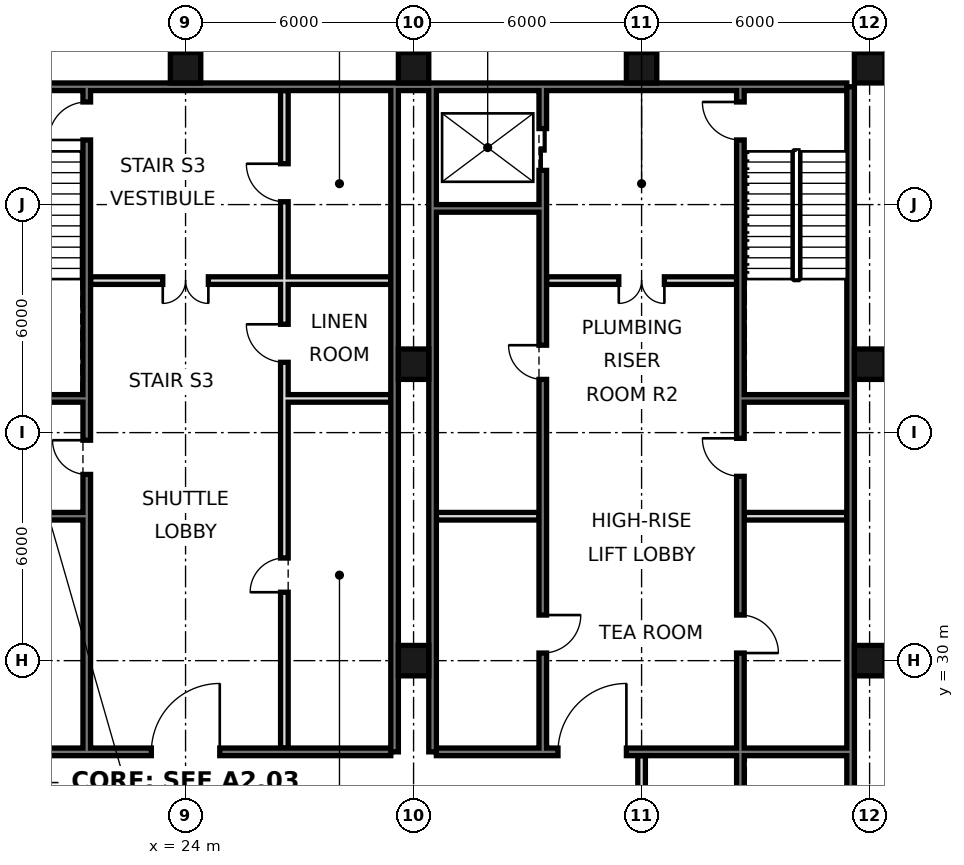
"""IFC4 building model, lengths in metres.
Left out: names, types, materials, properties, quantities, classifications, styles, units other than length and angle.
Written with IfcOpenShell. Run it as: python <this file> out.ifc"""

import sys

from ifc_helpers import new_model, si_unit, direction, frame, frame_2d, origin, origin_2d, place, context, subcontext, project, spatial, rectangle, hollow_rectangle, extrude, element, fill, save


model = new_model("IFC4")
c1 = context("Model", 3, precision=1e-05, world=origin(), true_north=direction((0.0, 1.0)))
c2 = subcontext(c1, "Body", "Model", "MODEL_VIEW")
j1 = project(units=[si_unit("LENGTHUNIT", "METRE"), si_unit("PLANEANGLEUNIT", "RADIAN")], contexts=[c1])
p1 = place(None, origin())
s1 = spatial("IfcSite", under=j1, at=p1, CompositionType="ELEMENT")
p2 = place(p1, origin())
s2 = spatial("IfcBuilding", under=s1, at=p2, CompositionType="ELEMENT")
p3 = place(p2, frame((0.0, 0.0, -4.5)))
s3 = spatial("IfcBuildingStorey", under=s2, at=p3, CompositionType="ELEMENT", Elevation=-4.5)
for number, where, z_axis, x_axis in (
    (1, (24.0, 45.6, 0.0), (0.0, 0.0, 1.0), (1.0, 0.0, 0.0)),
    (2, (30.0, 30.0, 0.0), (0.0, 0.0, 1.0), (1.0, 0.0, 0.0)),
    (3, (30.0, 37.8, 0.0), (0.0, 0.0, 1.0), (1.0, 0.0, 0.0)),
    (4, (30.0, 45.6, 0.0), (0.0, 0.0, 1.0), (1.0, 0.0, 0.0)),
    (5, (36.0, 45.6, 0.0), (0.0, 0.0, 1.0), (1.0, 0.0, 0.0)),
    (6, (42.0, 30.0, 0.0), (0.0, 0.0, 1.0), (1.0, 0.0, 0.0)),
    (7, (42.0, 37.8, 0.0), (0.0, 0.0, 1.0), (1.0, 0.0, 0.0)),
    (8, (42.0, 45.6, 0.0), (0.0, 0.0, 1.0), (1.0, 0.0, 0.0)),
):
    element("IfcColumn", number, at=place(p3, frame(where, z_axis=z_axis, x_axis=x_axis)), inside=s3, PredefinedType="COLUMN", context=c2, shape_type="SweptSolid", body=[
        extrude(hollow_rectangle(XDim=0.8, YDim=0.8, WallThickness=0.07, at=origin_2d()), origin(), (0.0, 0.0, 1.0), 4.5),
    ])
p4 = place(p3, frame((41.5, 21.6, 0.0), z_axis=(0.0, 0.0, 1.0), x_axis=(0.0, 1.0, 0.0)))
e9 = element("IfcWall", 9, at=p4, inside=s3, PredefinedType="SOLIDWALL", context=c2, shape_type="SweptSolid", body=[
    extrude(rectangle(XDim=23.5, YDim=0.2, at=frame_2d((11.75, 0.0))), origin(), (0.0, 0.0, 1.0), 4.14),
])
p5 = place(p3, frame((6.6, 45.1, 0.0), z_axis=(0.0, 0.0, 1.0), x_axis=(1.0, 0.0, 0.0)))
e10 = element("IfcWall", 10, at=p5, inside=s3, PredefinedType="SOLIDWALL", context=c2, shape_type="SweptSolid", body=[
    extrude(rectangle(XDim=34.8, YDim=0.2, at=frame_2d((17.4, 0.0))), origin(), (0.0, 0.0, 1.0), 4.14),
])
for number, where, z_axis, x_axis in (
    (11, (29.5, 27.6, 0.0), (0.0, 0.0, 1.0), (0.0, 1.0, 0.0)),
    (12, (30.5, 27.6, 0.0), (0.0, 0.0, 1.0), (0.0, 1.0, 0.0)),
):
    element("IfcWall", number, at=place(p3, frame(where, z_axis=z_axis, x_axis=x_axis)), inside=s3, PredefinedType="SOLIDWALL", context=c2, shape_type="SweptSolid", body=[
        extrude(rectangle(XDim=17.5, YDim=0.2, at=frame_2d((8.75, 0.0))), origin(), (0.0, 0.0, 1.0), 4.14),
    ])
p6 = place(p3, frame((21.4, 27.7, 0.0), z_axis=(0.0, 0.0, 1.0), x_axis=(0.0, 1.0, 0.0)))
e13 = element("IfcWall", 13, at=p6, inside=s3, PredefinedType="SOLIDWALL", context=c2, shape_type="SweptSolid", body=[
    extrude(rectangle(XDim=17.3, YDim=0.2, at=frame_2d((8.65, 0.0))), origin(), (0.0, 0.0, 1.0), 4.14),
])
p7 = place(p6, frame((16.0, 0.0, 0.0)))
e14 = element("IfcOpeningElement", 14, at=p7, cuts=e13, PredefinedType="OPENING", context=c2, shape_type="SweptSolid", body=[
    extrude(rectangle(XDim=1.0, YDim=2.1, at=frame_2d((0.5, 1.05))), frame((0.0, 0.11, 0.0), z_axis=(0.0, -1.0, 0.0), x_axis=(1.0, 0.0, 0.0)), (0.0, 0.0, 1.0), 0.22),
])
p8 = place(p6, frame((7.2, 0.0, 0.0)))
e15 = element("IfcOpeningElement", 15, at=p8, cuts=e13, PredefinedType="OPENING", context=c2, shape_type="SweptSolid", body=[
    extrude(rectangle(XDim=0.9, YDim=2.1, at=frame_2d((0.45, 1.05))), frame((0.0, 0.11, 0.0), z_axis=(0.0, -1.0, 0.0), x_axis=(1.0, 0.0, 0.0)), (0.0, 0.0, 1.0), 0.22),
])
p9 = place(p3, frame((26.6, 27.7, 0.0), z_axis=(0.0, 0.0, 1.0), x_axis=(0.0, 1.0, 0.0)))
e16 = element("IfcWall", 16, at=p9, inside=s3, PredefinedType="SOLIDWALL", context=c2, shape_type="SweptSolid", body=[
    extrude(rectangle(XDim=17.3, YDim=0.2, at=frame_2d((8.65, 0.0))), origin(), (0.0, 0.0, 1.0), 4.14),
])
p10 = place(p9, frame((4.1, 0.0, 0.0)))
e17 = element("IfcOpeningElement", 17, at=p10, cuts=e16, PredefinedType="OPENING", context=c2, shape_type="SweptSolid", body=[
    extrude(rectangle(XDim=0.9, YDim=2.1, at=frame_2d((0.45, 1.05))), frame((0.0, 0.11, 0.0), z_axis=(0.0, -1.0, 0.0), x_axis=(1.0, 0.0, 0.0)), (0.0, 0.0, 1.0), 0.22),
])
p11 = place(p9, frame((10.15, 0.0, 0.0)))
e18 = element("IfcOpeningElement", 18, at=p11, cuts=e16, PredefinedType="OPENING", context=c2, shape_type="SweptSolid", body=[
    extrude(rectangle(XDim=1.0, YDim=2.1, at=frame_2d((0.5, 1.05))), frame((0.0, 0.11, 0.0), z_axis=(0.0, -1.0, 0.0), x_axis=(1.0, 0.0, 0.0)), (0.0, 0.0, 1.0), 0.22),
])
p12 = place(p9, frame((14.375, 0.0, 0.0)))
e19 = element("IfcOpeningElement", 19, at=p12, cuts=e16, PredefinedType="OPENING", context=c2, shape_type="SweptSolid", body=[
    extrude(rectangle(XDim=1.0, YDim=2.1, at=frame_2d((0.5, 1.05))), frame((0.0, 0.11, 0.0), z_axis=(0.0, -1.0, 0.0), x_axis=(1.0, 0.0, 0.0)), (0.0, 0.0, 1.0), 0.22),
])
p13 = place(p3, frame((33.4, 27.7, 0.0), z_axis=(0.0, 0.0, 1.0), x_axis=(0.0, 1.0, 0.0)))
e20 = element("IfcWall", 20, at=p13, inside=s3, PredefinedType="SOLIDWALL", context=c2, shape_type="SweptSolid", body=[
    extrude(rectangle(XDim=17.3, YDim=0.2, at=frame_2d((8.65, 0.0))), origin(), (0.0, 0.0, 1.0), 3.04),
])
p14 = place(p13, frame((15.2, 0.0, 0.0)))
e21 = element("IfcOpeningElement", 21, at=p14, cuts=e20, PredefinedType="OPENING", context=c2, shape_type="SweptSolid", body=[
    extrude(rectangle(XDim=1.1, YDim=2.1, at=frame_2d((0.55, 1.05))), frame((0.0, 0.11, 0.0), z_axis=(0.0, -1.0, 0.0), x_axis=(1.0, 0.0, 0.0)), (0.0, 0.0, 1.0), 0.22),
])
p15 = place(p13, frame((2.5, 0.0, 0.0)))
e22 = element("IfcOpeningElement", 22, at=p15, cuts=e20, PredefinedType="OPENING", context=c2, shape_type="SweptSolid", body=[
    extrude(rectangle(XDim=1.0, YDim=2.1, at=frame_2d((0.5, 1.05))), frame((0.0, 0.11, 0.0), z_axis=(0.0, -1.0, 0.0), x_axis=(1.0, 0.0, 0.0)), (0.0, 0.0, 1.0), 0.22),
])
p16 = place(p13, frame((9.7, 0.0, 0.0)))
e23 = element("IfcOpeningElement", 23, at=p16, cuts=e20, PredefinedType="OPENING", context=c2, shape_type="SweptSolid", body=[
    extrude(rectangle(XDim=0.9, YDim=2.1, at=frame_2d((0.45, 1.05))), frame((0.0, 0.11, 0.0), z_axis=(0.0, -1.0, 0.0), x_axis=(1.0, 0.0, 0.0)), (0.0, 0.0, 1.0), 0.22),
])
p17 = place(p3, frame((36.0, 21.5, 0.0), z_axis=(0.0, 0.0, 1.0), x_axis=(0.0, 1.0, 0.0)))
e24 = element("IfcWall", 24, at=p17, inside=s3, PredefinedType="PARTITIONING", context=c2, shape_type="SweptSolid", body=[
    extrude(rectangle(XDim=6.0, YDim=0.2, at=frame_2d((3.0, 0.0))), origin(), (0.0, 0.0, 1.0), 3.04),
])
p18 = place(p3, frame((38.6, 21.5, 0.0), z_axis=(0.0, 0.0, 1.0), x_axis=(0.0, 1.0, 0.0)))
e25 = element("IfcWall", 25, at=p18, inside=s3, PredefinedType="SOLIDWALL", context=c2, shape_type="SweptSolid", body=[
    extrude(rectangle(XDim=23.5, YDim=0.2, at=frame_2d((11.75, 0.0))), origin(), (0.0, 0.0, 1.0), 3.04),
])
p19 = place(p18, frame((8.7, 0.0, 0.0)))
e26 = element("IfcOpeningElement", 26, at=p19, cuts=e25, PredefinedType="OPENING", context=c2, shape_type="SweptSolid", body=[
    extrude(rectangle(XDim=1.0, YDim=2.1, at=frame_2d((0.5, 1.05))), frame((0.0, 0.11, 0.0), z_axis=(0.0, -1.0, 0.0), x_axis=(1.0, 0.0, 0.0)), (0.0, 0.0, 1.0), 0.22),
])
p20 = place(p18, frame((13.35, 0.0, 0.0)))
e27 = element("IfcOpeningElement", 27, at=p20, cuts=e25, PredefinedType="OPENING", context=c2, shape_type="SweptSolid", body=[
    extrude(rectangle(XDim=1.0, YDim=2.1, at=frame_2d((0.5, 1.05))), frame((0.0, 0.11, 0.0), z_axis=(0.0, -1.0, 0.0), x_axis=(1.0, 0.0, 0.0)), (0.0, 0.0, 1.0), 0.22),
])
p21 = place(p18, frame((22.2, 0.0, 0.0)))
e28 = element("IfcOpeningElement", 28, at=p21, cuts=e25, PredefinedType="OPENING", context=c2, shape_type="SweptSolid", body=[
    extrude(rectangle(XDim=1.0, YDim=2.1, at=frame_2d((0.5, 1.05))), frame((0.0, 0.11, 0.0), z_axis=(0.0, -1.0, 0.0), x_axis=(1.0, 0.0, 0.0)), (0.0, 0.0, 1.0), 0.22),
])
p22 = place(p18, frame((0.275, 0.0, 0.0)))
e29 = element("IfcOpeningElement", 29, at=p22, cuts=e25, PredefinedType="OPENING", context=c2, shape_type="SweptSolid", body=[
    extrude(rectangle(XDim=0.9, YDim=2.1, at=frame_2d((0.45, 1.05))), frame((0.0, 0.11, 0.0), z_axis=(0.0, -1.0, 0.0), x_axis=(1.0, 0.0, 0.0)), (0.0, 0.0, 1.0), 0.22),
])
p23 = place(p3, frame((18.6, 27.6, 0.0), z_axis=(0.0, 0.0, 1.0), x_axis=(1.0, 0.0, 0.0)))
e30 = element("IfcWall", 30, at=p23, inside=s3, PredefinedType="SOLIDWALL", context=c2, shape_type="SweptSolid", body=[
    extrude(rectangle(XDim=10.8, YDim=0.2, at=frame_2d((5.4, 0.0))), origin(), (0.0, 0.0, 1.0), 4.14),
])
p24 = place(p23, frame((4.5, 0.0, 0.0)))
e31 = element("IfcOpeningElement", 31, at=p24, cuts=e30, PredefinedType="OPENING", context=c2, shape_type="SweptSolid", body=[
    extrude(rectangle(XDim=1.8, YDim=2.1, at=frame_2d((0.9, 1.05))), frame((0.0, 0.11, 0.0), z_axis=(0.0, -1.0, 0.0), x_axis=(1.0, 0.0, 0.0)), (0.0, 0.0, 1.0), 0.22),
])
p25 = place(p3, frame((30.6, 27.6, 0.0), z_axis=(0.0, 0.0, 1.0), x_axis=(1.0, 0.0, 0.0)))
e32 = element("IfcWall", 32, at=p25, inside=s3, PredefinedType="SOLIDWALL", context=c2, shape_type="SweptSolid", body=[
    extrude(rectangle(XDim=10.8, YDim=0.2, at=frame_2d((5.4, 0.0))), origin(), (0.0, 0.0, 1.0), 4.14),
])
p26 = place(p25, frame((3.2, 0.0, 0.0)))
e33 = element("IfcOpeningElement", 33, at=p26, cuts=e32, PredefinedType="OPENING", context=c2, shape_type="SweptSolid", body=[
    extrude(rectangle(XDim=1.8, YDim=2.1, at=frame_2d((0.9, 1.05))), frame((0.0, 0.11, 0.0), z_axis=(0.0, -1.0, 0.0), x_axis=(1.0, 0.0, 0.0)), (0.0, 0.0, 1.0), 0.22),
])
for number, where, z_axis, x_axis in (
    (34, (18.6, 33.8, 0.0), (0.0, 0.0, 1.0), (1.0, 0.0, 0.0)),
    (35, (30.6, 33.8, 0.0), (0.0, 0.0, 1.0), (1.0, 0.0, 0.0)),
):
    element("IfcWall", number, at=place(p3, frame(where, z_axis=z_axis, x_axis=x_axis)), inside=s3, PredefinedType="SOLIDWALL", context=c2, shape_type="SweptSolid", body=[
        extrude(rectangle(XDim=2.7, YDim=0.2, at=frame_2d((1.35, 0.0))), origin(), (0.0, 0.0, 1.0), 4.14),
    ])
p27 = place(p3, frame((38.7, 33.8, 0.0), z_axis=(0.0, 0.0, 1.0), x_axis=(1.0, 0.0, 0.0)))
e36 = element("IfcWall", 36, at=p27, inside=s3, PredefinedType="PARTITIONING", context=c2, shape_type="SweptSolid", body=[
    extrude(rectangle(XDim=2.7, YDim=0.2, at=frame_2d((1.35, 0.0))), origin(), (0.0, 0.0, 1.0), 4.14),
])
for number, where, z_axis, x_axis in (
    (37, (18.6, 36.9, 0.0), (0.0, 0.0, 1.0), (1.0, 0.0, 0.0)),
    (38, (26.7, 36.9, 0.0), (0.0, 0.0, 1.0), (1.0, 0.0, 0.0)),
    (39, (38.7, 36.9, 0.0), (0.0, 0.0, 1.0), (1.0, 0.0, 0.0)),
):
    element("IfcWall", number, at=place(p3, frame(where, z_axis=z_axis, x_axis=x_axis)), inside=s3, PredefinedType="SOLIDWALL", context=c2, shape_type="SweptSolid", body=[
        extrude(rectangle(XDim=2.7, YDim=0.2, at=frame_2d((1.35, 0.0))), origin(), (0.0, 0.0, 1.0), 4.14),
    ])
p28 = place(p3, frame((21.5, 40.0, 0.0), z_axis=(0.0, 0.0, 1.0), x_axis=(1.0, 0.0, 0.0)))
e40 = element("IfcWall", 40, at=p28, inside=s3, PredefinedType="PARTITIONING", context=c2, shape_type="SweptSolid", body=[
    extrude(rectangle(XDim=7.9, YDim=0.2, at=frame_2d((3.95, 0.0))), origin(), (0.0, 0.0, 1.0), 4.14),
])
p29 = place(p28, frame((1.9, 0.0, 0.0)))
e41 = element("IfcOpeningElement", 41, at=p29, cuts=e40, PredefinedType="OPENING", context=c2, shape_type="SweptSolid", body=[
    extrude(rectangle(XDim=1.2, YDim=2.1, at=frame_2d((0.6, 1.05))), frame((0.0, 0.11, 0.0), z_axis=(0.0, -1.0, 0.0), x_axis=(1.0, 0.0, 0.0)), (0.0, 0.0, 1.0), 0.22),
])
p30 = place(p3, frame((33.5, 40.0, 0.0), z_axis=(0.0, 0.0, 1.0), x_axis=(1.0, 0.0, 0.0)))
e42 = element("IfcWall", 42, at=p30, inside=s3, PredefinedType="PARTITIONING", context=c2, shape_type="SweptSolid", body=[
    extrude(rectangle(XDim=5.0, YDim=0.2, at=frame_2d((2.5, 0.0))), origin(), (0.0, 0.0, 1.0), 4.14),
])
p31 = place(p30, frame((1.9, 0.0, 0.0)))
e43 = element("IfcOpeningElement", 43, at=p31, cuts=e42, PredefinedType="OPENING", context=c2, shape_type="SweptSolid", body=[
    extrude(rectangle(XDim=1.2, YDim=2.1, at=frame_2d((0.6, 1.05))), frame((0.0, 0.11, 0.0), z_axis=(0.0, -1.0, 0.0), x_axis=(1.0, 0.0, 0.0)), (0.0, 0.0, 1.0), 0.22),
])
p32 = place(p3, frame((30.6, 41.9, 0.0), z_axis=(0.0, 0.0, 1.0), x_axis=(1.0, 0.0, 0.0)))
e44 = element("IfcWall", 44, at=p32, inside=s3, PredefinedType="SOLIDWALL", context=c2, shape_type="SweptSolid", body=[
    extrude(rectangle(XDim=2.7, YDim=0.2, at=frame_2d((1.35, 0.0))), origin(), (0.0, 0.0, 1.0), 4.14),
])
p33 = place(p24, frame((1.8, 0.0, 0.0), z_axis=(0.0, 0.0, 1.0), x_axis=(-1.0, 0.0, 0.0)))
e45 = element("IfcDoor", 45, at=p33, inside=s3, OperationType="SINGLE_SWING_LEFT", PredefinedType="DOOR", context=c2, shape_type="SweptSolid", body=[
    extrude(rectangle(XDim=1.8, YDim=2.1, at=frame_2d((0.9, 1.05))), frame((0.0, 0.025, 0.0), z_axis=(0.0, -1.0, 0.0), x_axis=(1.0, 0.0, 0.0)), (0.0, 0.0, 1.0), 0.05),
])
fill(e31, e45)
p34 = place(p29, frame((1.2, 0.0, 0.0), z_axis=(0.0, 0.0, 1.0), x_axis=(-1.0, 0.0, 0.0)))
e46 = element("IfcDoor", 46, at=p34, inside=s3, OperationType="DOUBLE_DOOR_SINGLE_SWING", PredefinedType="DOOR", context=c2, shape_type="SweptSolid", body=[
    extrude(rectangle(XDim=1.2, YDim=2.1, at=frame_2d((0.6, 1.05))), frame((0.0, 0.025, 0.0), z_axis=(0.0, -1.0, 0.0), x_axis=(1.0, 0.0, 0.0)), (0.0, 0.0, 1.0), 0.05),
])
fill(e41, e46)
p35 = place(p26, frame((1.8, 0.0, 0.0), z_axis=(0.0, 0.0, 1.0), x_axis=(-1.0, 0.0, 0.0)))
e47 = element("IfcDoor", 47, at=p35, inside=s3, OperationType="SINGLE_SWING_LEFT", PredefinedType="DOOR", context=c2, shape_type="SweptSolid", body=[
    extrude(rectangle(XDim=1.8, YDim=2.1, at=frame_2d((0.9, 1.05))), frame((0.0, 0.025, 0.0), z_axis=(0.0, -1.0, 0.0), x_axis=(1.0, 0.0, 0.0)), (0.0, 0.0, 1.0), 0.05),
])
fill(e33, e47)
p36 = place(p31, frame((1.2, 0.0, 0.0), z_axis=(0.0, 0.0, 1.0), x_axis=(-1.0, 0.0, 0.0)))
e48 = element("IfcDoor", 48, at=p36, inside=s3, OperationType="DOUBLE_DOOR_SINGLE_SWING", PredefinedType="DOOR", context=c2, shape_type="SweptSolid", body=[
    extrude(rectangle(XDim=1.2, YDim=2.1, at=frame_2d((0.6, 1.05))), frame((0.0, 0.025, 0.0), z_axis=(0.0, -1.0, 0.0), x_axis=(1.0, 0.0, 0.0)), (0.0, 0.0, 1.0), 0.05),
])
fill(e43, e48)
p37 = place(p14, origin())
e49 = element("IfcDoor", 49, at=p37, inside=s3, OperationType="DOUBLE_DOOR_SLIDING", PredefinedType="DOOR", context=c2, shape_type="SweptSolid", body=[
    extrude(rectangle(XDim=1.1, YDim=2.1, at=frame_2d((0.55, 1.05))), frame((0.0, 0.025, 0.0), z_axis=(0.0, -1.0, 0.0), x_axis=(1.0, 0.0, 0.0)), (0.0, 0.0, 1.0), 0.05),
])
fill(e21, e49)
p38 = place(p19, frame((1.0, 0.0, 0.0), z_axis=(0.0, 0.0, 1.0), x_axis=(-1.0, 0.0, 0.0)))
e50 = element("IfcDoor", 50, at=p38, inside=s3, OperationType="SINGLE_SWING_RIGHT", PredefinedType="DOOR", context=c2, shape_type="SweptSolid", body=[
    extrude(rectangle(XDim=1.0, YDim=2.1, at=frame_2d((0.5, 1.05))), frame((0.0, 0.025, 0.0), z_axis=(0.0, -1.0, 0.0), x_axis=(1.0, 0.0, 0.0)), (0.0, 0.0, 1.0), 0.05),
])
fill(e26, e50)
p39 = place(p20, frame((1.0, 0.0, 0.0), z_axis=(0.0, 0.0, 1.0), x_axis=(-1.0, 0.0, 0.0)))
e51 = element("IfcDoor", 51, at=p39, inside=s3, OperationType="SINGLE_SWING_LEFT", PredefinedType="DOOR", context=c2, shape_type="SweptSolid", body=[
    extrude(rectangle(XDim=1.0, YDim=2.1, at=frame_2d((0.5, 1.05))), frame((0.0, 0.025, 0.0), z_axis=(0.0, -1.0, 0.0), x_axis=(1.0, 0.0, 0.0)), (0.0, 0.0, 1.0), 0.05),
])
fill(e27, e51)
p40 = place(p15, origin())
e52 = element("IfcDoor", 52, at=p40, inside=s3, OperationType="SINGLE_SWING_RIGHT", PredefinedType="DOOR", context=c2, shape_type="SweptSolid", body=[
    extrude(rectangle(XDim=1.0, YDim=2.1, at=frame_2d((0.5, 1.05))), frame((0.0, 0.025, 0.0), z_axis=(0.0, -1.0, 0.0), x_axis=(1.0, 0.0, 0.0)), (0.0, 0.0, 1.0), 0.05),
])
fill(e22, e52)
p41 = place(p21, frame((1.0, 0.0, 0.0), z_axis=(0.0, 0.0, 1.0), x_axis=(-1.0, 0.0, 0.0)))
e53 = element("IfcDoor", 53, at=p41, inside=s3, OperationType="SINGLE_SWING_LEFT", PredefinedType="DOOR", context=c2, shape_type="SweptSolid", body=[
    extrude(rectangle(XDim=1.0, YDim=2.1, at=frame_2d((0.5, 1.05))), frame((0.0, 0.025, 0.0), z_axis=(0.0, -1.0, 0.0), x_axis=(1.0, 0.0, 0.0)), (0.0, 0.0, 1.0), 0.05),
])
fill(e28, e53)
p42 = place(p7, origin())
e54 = element("IfcDoor", 54, at=p42, inside=s3, OperationType="SINGLE_SWING_LEFT", PredefinedType="DOOR", context=c2, shape_type="SweptSolid", body=[
    extrude(rectangle(XDim=1.0, YDim=2.1, at=frame_2d((0.5, 1.05))), frame((0.0, 0.025, 0.0), z_axis=(0.0, -1.0, 0.0), x_axis=(1.0, 0.0, 0.0)), (0.0, 0.0, 1.0), 0.05),
])
fill(e14, e54)
p43 = place(p16, frame((0.9, 0.0, 0.0), z_axis=(0.0, 0.0, 1.0), x_axis=(-1.0, 0.0, 0.0)))
e55 = element("IfcDoor", 55, at=p43, inside=s3, OperationType="SINGLE_SWING_LEFT", PredefinedType="DOOR", context=c2, shape_type="SweptSolid", body=[
    extrude(rectangle(XDim=0.9, YDim=2.1, at=frame_2d((0.45, 1.05))), frame((0.0, 0.025, 0.0), z_axis=(0.0, -1.0, 0.0), x_axis=(1.0, 0.0, 0.0)), (0.0, 0.0, 1.0), 0.05),
])
fill(e23, e55)
p44 = place(p8, frame((0.9, 0.0, 0.0), z_axis=(0.0, 0.0, 1.0), x_axis=(-1.0, 0.0, 0.0)))
e56 = element("IfcDoor", 56, at=p44, inside=s3, OperationType="SINGLE_SWING_LEFT", PredefinedType="DOOR", context=c2, shape_type="SweptSolid", body=[
    extrude(rectangle(XDim=0.9, YDim=2.1, at=frame_2d((0.45, 1.05))), frame((0.0, 0.025, 0.0), z_axis=(0.0, -1.0, 0.0), x_axis=(1.0, 0.0, 0.0)), (0.0, 0.0, 1.0), 0.05),
])
fill(e15, e56)
p45 = place(p10, origin())
e57 = element("IfcDoor", 57, at=p45, inside=s3, OperationType="SINGLE_SWING_LEFT", PredefinedType="DOOR", context=c2, shape_type="SweptSolid", body=[
    extrude(rectangle(XDim=0.9, YDim=2.1, at=frame_2d((0.45, 1.05))), frame((0.0, 0.025, 0.0), z_axis=(0.0, -1.0, 0.0), x_axis=(1.0, 0.0, 0.0)), (0.0, 0.0, 1.0), 0.05),
])
fill(e17, e57)
p46 = place(p11, frame((1.0, 0.0, 0.0), z_axis=(0.0, 0.0, 1.0), x_axis=(-1.0, 0.0, 0.0)))
e58 = element("IfcDoor", 58, at=p46, inside=s3, OperationType="SINGLE_SWING_LEFT", PredefinedType="DOOR", context=c2, shape_type="SweptSolid", body=[
    extrude(rectangle(XDim=1.0, YDim=2.1, at=frame_2d((0.5, 1.05))), frame((0.0, 0.025, 0.0), z_axis=(0.0, -1.0, 0.0), x_axis=(1.0, 0.0, 0.0)), (0.0, 0.0, 1.0), 0.05),
])
fill(e18, e58)
p47 = place(p12, frame((1.0, 0.0, 0.0), z_axis=(0.0, 0.0, 1.0), x_axis=(-1.0, 0.0, 0.0)))
e59 = element("IfcDoor", 59, at=p47, inside=s3, OperationType="SINGLE_SWING_LEFT", PredefinedType="DOOR", context=c2, shape_type="SweptSolid", body=[
    extrude(rectangle(XDim=1.0, YDim=2.1, at=frame_2d((0.5, 1.05))), frame((0.0, 0.025, 0.0), z_axis=(0.0, -1.0, 0.0), x_axis=(1.0, 0.0, 0.0)), (0.0, 0.0, 1.0), 0.05),
])
fill(e19, e59)
save(model, sys.argv[1])
